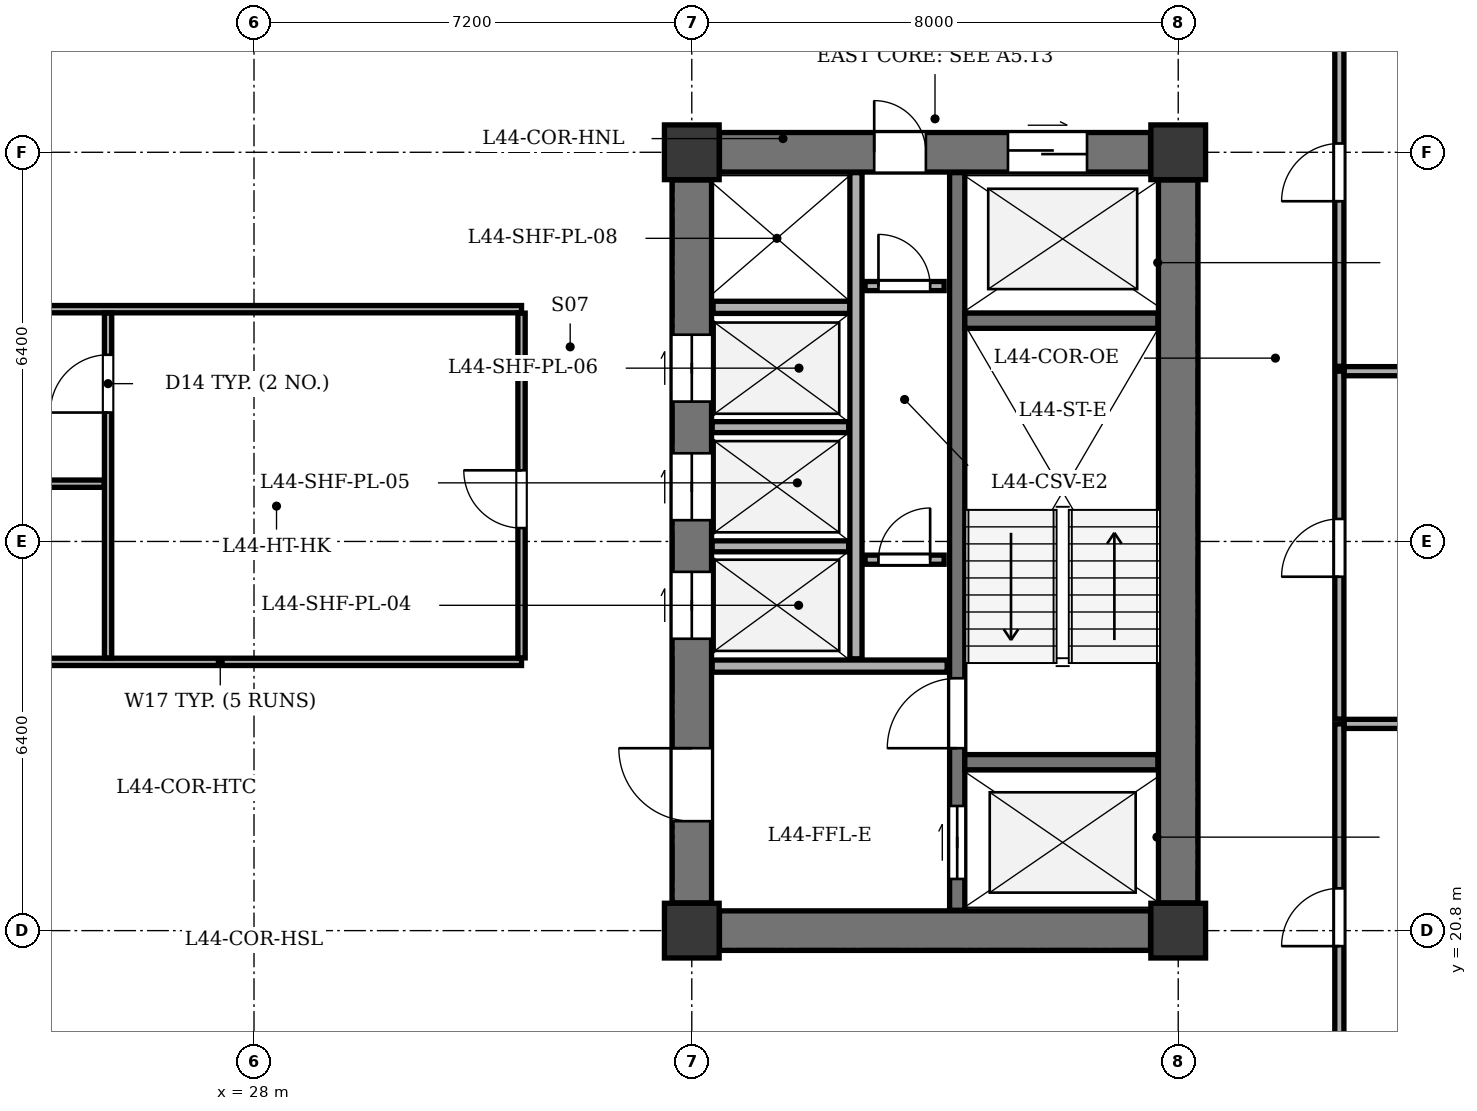
"""IFC4 building model, lengths in metres.
Left out: names, types, materials, properties, quantities, classifications, styles, units other than length and angle.
Written with IfcOpenShell. Run it as: python <this file> out.ifc"""

import sys

from ifc_helpers import new_model, si_unit, direction, frame, frame_2d, origin, origin_2d, place, context, subcontext, project, spatial, rectangle, extrude, element, fill, save


model = new_model("IFC4")
c1 = context("Model", 3, precision=1e-05, world=origin(), true_north=direction((0.0, 1.0)))
c2 = subcontext(c1, "Body", "Model", "MODEL_VIEW")
j1 = project(units=[si_unit("LENGTHUNIT", "METRE"), si_unit("PLANEANGLEUNIT", "RADIAN")], contexts=[c1])
p1 = place(None, origin())
s1 = spatial("IfcSite", under=j1, at=p1, CompositionType="ELEMENT")
p2 = place(p1, origin())
s2 = spatial("IfcBuilding", under=s1, at=p2, CompositionType="ELEMENT")
p3 = place(p2, frame((0.0, 0.0, 172.8)))
s3 = spatial("IfcBuildingStorey", under=s2, at=p3, CompositionType="ELEMENT", Elevation=172.8)
for number, where, z_axis, x_axis in (
    (1, (35.2, 20.8, 0.0), (0.0, 0.0, 1.0), (1.0, 0.0, 0.0)),
    (2, (43.2, 20.8, 0.0), (0.0, 0.0, 1.0), (1.0, 0.0, 0.0)),
    (3, (35.2, 33.6, 0.0), (0.0, 0.0, 1.0), (1.0, 0.0, 0.0)),
    (4, (43.2, 33.6, 0.0), (0.0, 0.0, 1.0), (1.0, 0.0, 0.0)),
):
    element("IfcColumn", number, at=place(p3, frame(where, z_axis=z_axis, x_axis=x_axis)), inside=s3, PredefinedType="COLUMN", context=c2, shape_type="SweptSolid", body=[
        extrude(rectangle(XDim=0.9, YDim=0.9, at=origin_2d()), origin(), (0.0, 0.0, 1.0), 3.5),
    ])
p4 = place(p3, frame((43.2, 21.255, 0.0), z_axis=(0.0, 0.0, 1.0), x_axis=(0.0, 1.0, 0.0)))
e5 = element("IfcWall", 5, at=p4, inside=s3, PredefinedType="SHEAR", context=c2, shape_type="SweptSolid", body=[
    extrude(rectangle(XDim=11.89, YDim=0.65, at=frame_2d((5.945, 0.0))), origin(), (0.0, 0.0, 1.0), 3.2),
])
p5 = place(p3, frame((35.655, 20.8, 0.0), z_axis=(0.0, 0.0, 1.0), x_axis=(1.0, 0.0, 0.0)))
e6 = element("IfcWall", 6, at=p5, inside=s3, PredefinedType="SHEAR", context=c2, shape_type="SweptSolid", body=[
    extrude(rectangle(XDim=7.09, YDim=0.65, at=frame_2d((3.545, 0.0))), origin(), (0.0, 0.0, 1.0), 3.2),
])
p6 = place(p3, frame((35.655, 33.6, 0.0), z_axis=(0.0, 0.0, 1.0), x_axis=(1.0, 0.0, 0.0)))
e7 = element("IfcWall", 7, at=p6, inside=s3, PredefinedType="SHEAR", context=c2, shape_type="SweptSolid", body=[
    extrude(rectangle(XDim=7.09, YDim=0.65, at=frame_2d((3.545, 0.0))), origin(), (0.0, 0.0, 1.0), 3.2),
])
p7 = place(p6, frame((4.745, 0.0, 0.0)))
e8 = element("IfcOpeningElement", 8, at=p7, cuts=e7, PredefinedType="OPENING", context=c2, shape_type="SweptSolid", body=[
    extrude(rectangle(XDim=1.3, YDim=2.15, at=frame_2d((0.65, 1.075))), frame((0.0, 0.335, 0.0), z_axis=(0.0, -1.0, 0.0), x_axis=(1.0, 0.0, 0.0)), (0.0, 0.0, 1.0), 0.67),
])
p8 = place(p6, frame((2.545, 0.0, 0.0)))
e9 = element("IfcOpeningElement", 9, at=p8, cuts=e7, PredefinedType="OPENING", context=c2, shape_type="SweptSolid", body=[
    extrude(rectangle(XDim=0.85, YDim=2.02, at=frame_2d((0.425, 1.01))), frame((0.0, 0.335, 0.0), z_axis=(0.0, -1.0, 0.0), x_axis=(1.0, 0.0, 0.0)), (0.0, 0.0, 1.0), 0.67),
])
p9 = place(p3, frame((35.2, 21.255, 0.0), z_axis=(0.0, 0.0, 1.0), x_axis=(0.0, 1.0, 0.0)))
e10 = element("IfcWall", 10, at=p9, inside=s3, PredefinedType="SHEAR", context=c2, shape_type="SweptSolid", body=[
    extrude(rectangle(XDim=11.89, YDim=0.65, at=frame_2d((5.945, 0.0))), origin(), (0.0, 0.0, 1.0), 3.2),
])
p10 = place(p9, frame((1.345, 0.0, 0.0)))
e11 = element("IfcOpeningElement", 11, at=p10, cuts=e10, PredefinedType="OPENING", context=c2, shape_type="SweptSolid", body=[
    extrude(rectangle(XDim=1.2, YDim=2.15, at=frame_2d((0.6, 1.075))), frame((0.0, 0.335, 0.0), z_axis=(0.0, -1.0, 0.0), x_axis=(1.0, 0.0, 0.0)), (0.0, 0.0, 1.0), 0.67),
])
p11 = place(p9, frame((4.345, 0.0, 0.0)))
e12 = element("IfcOpeningElement", 12, at=p11, cuts=e10, PredefinedType="OPENING", context=c2, shape_type="SweptSolid", body=[
    extrude(rectangle(XDim=1.1, YDim=2.1, at=frame_2d((0.55, 1.05))), frame((0.0, 0.335, 0.0), z_axis=(0.0, -1.0, 0.0), x_axis=(1.0, 0.0, 0.0)), (0.0, 0.0, 1.0), 0.67),
])
p12 = place(p9, frame((6.295, 0.0, 0.0)))
e13 = element("IfcOpeningElement", 13, at=p12, cuts=e10, PredefinedType="OPENING", context=c2, shape_type="SweptSolid", body=[
    extrude(rectangle(XDim=1.1, YDim=2.1, at=frame_2d((0.55, 1.05))), frame((0.0, 0.335, 0.0), z_axis=(0.0, -1.0, 0.0), x_axis=(1.0, 0.0, 0.0)), (0.0, 0.0, 1.0), 0.67),
])
p13 = place(p9, frame((8.245, 0.0, 0.0)))
e14 = element("IfcOpeningElement", 14, at=p13, cuts=e10, PredefinedType="OPENING", context=c2, shape_type="SweptSolid", body=[
    extrude(rectangle(XDim=1.1, YDim=2.1, at=frame_2d((0.55, 1.05))), frame((0.0, 0.335, 0.0), z_axis=(0.0, -1.0, 0.0), x_axis=(1.0, 0.0, 0.0)), (0.0, 0.0, 1.0), 0.67),
])
p14 = place(p3, frame((39.565, 21.135, 0.0), z_axis=(0.0, 0.0, 1.0), x_axis=(0.0, 1.0, 0.0)))
e15 = element("IfcWall", 15, at=p14, inside=s3, PredefinedType="SHEAR", context=c2, shape_type="SweptSolid", body=[
    extrude(rectangle(XDim=12.13, YDim=0.25, at=frame_2d((6.065, 0.0))), origin(), (0.0, 0.0, 1.0), 3.2),
])
p15 = place(p14, frame((0.515, 0.0, 0.0)))
e16 = element("IfcOpeningElement", 16, at=p15, cuts=e15, PredefinedType="OPENING", context=c2, shape_type="SweptSolid", body=[
    extrude(rectangle(XDim=1.2, YDim=2.15, at=frame_2d((0.6, 1.075))), frame((0.0, 0.135, 0.0), z_axis=(0.0, -1.0, 0.0), x_axis=(1.0, 0.0, 0.0)), (0.0, 0.0, 1.0), 0.27),
])
p16 = place(p14, frame((2.665, 0.0, 0.0)))
e17 = element("IfcOpeningElement", 17, at=p16, cuts=e15, PredefinedType="OPENING", context=c2, shape_type="SweptSolid", body=[
    extrude(rectangle(XDim=1.15, YDim=2.15, at=frame_2d((0.575, 1.075))), frame((0.0, 0.135, 0.0), z_axis=(0.0, -1.0, 0.0), x_axis=(1.0, 0.0, 0.0)), (0.0, 0.0, 1.0), 0.27),
])
for number, where, z_axis, x_axis in (
    (18, (39.69, 23.57, 0.0), (0.0, 0.0, 1.0), (1.0, 0.0, 0.0)),
    (19, (39.69, 30.83, 0.0), (0.0, 0.0, 1.0), (1.0, 0.0, 0.0)),
):
    element("IfcWall", number, at=place(p3, frame(where, z_axis=z_axis, x_axis=x_axis)), inside=s3, PredefinedType="SHEAR", context=c2, shape_type="SweptSolid", body=[
        extrude(rectangle(XDim=3.175, YDim=0.25, at=frame_2d((1.587, 0.0))), origin(), (0.0, 0.0, 1.0), 3.2),
    ])
p17 = place(p3, frame((35.535, 25.15, 0.0), z_axis=(0.0, 0.0, 1.0), x_axis=(1.0, 0.0, 0.0)))
e20 = element("IfcWall", 20, at=p17, inside=s3, PredefinedType="SOLIDWALL", context=c2, shape_type="SweptSolid", body=[
    extrude(rectangle(XDim=3.865, YDim=0.2, at=frame_2d((1.933, 0.0))), origin(), (0.0, 0.0, 1.0), 3.2),
])
p18 = place(p3, frame((35.55, 31.05, 0.0), z_axis=(0.0, 0.0, 1.0), x_axis=(1.0, 0.0, 0.0)))
e21 = element("IfcWall", 21, at=p18, inside=s3, PredefinedType="SOLIDWALL", context=c2, shape_type="SweptSolid", body=[
    extrude(rectangle(XDim=2.25, YDim=0.2, at=frame_2d((1.125, 0.0))), origin(), (0.0, 0.0, 1.0), 3.2),
])
p19 = place(p3, frame((37.9, 25.27, 0.0), z_axis=(0.0, 0.0, 1.0), x_axis=(0.0, 1.0, 0.0)))
e22 = element("IfcWall", 22, at=p19, inside=s3, PredefinedType="SOLIDWALL", context=c2, shape_type="SweptSolid", body=[
    extrude(rectangle(XDim=7.995, YDim=0.2, at=frame_2d((3.998, 0.0))), origin(), (0.0, 0.0, 1.0), 3.2),
])
for number, where, z_axis, x_axis in (
    (23, (35.535, 27.12, 0.0), (0.0, 0.0, 1.0), (1.0, 0.0, 0.0)),
    (24, (35.535, 29.08, 0.0), (0.0, 0.0, 1.0), (1.0, 0.0, 0.0)),
):
    element("IfcWall", number, at=place(p3, frame(where, z_axis=z_axis, x_axis=x_axis)), inside=s3, PredefinedType="PARTITIONING", context=c2, shape_type="SweptSolid", body=[
        extrude(rectangle(XDim=2.245, YDim=0.18, at=frame_2d((1.123, 0.0))), origin(), (0.0, 0.0, 1.0), 3.2),
    ])
p20 = place(p3, frame((38.05, 26.9, 0.0), z_axis=(0.0, 0.0, 1.0), x_axis=(1.0, 0.0, 0.0)))
e25 = element("IfcWall", 25, at=p20, inside=s3, PredefinedType="PARTITIONING", context=c2, shape_type="SweptSolid", body=[
    extrude(rectangle(XDim=1.3, YDim=0.15, at=frame_2d((0.65, 0.0))), origin(), (0.0, 0.0, 1.0), 3.2),
])
p21 = place(p20, frame((0.22, 0.0, 0.0)))
e26 = element("IfcOpeningElement", 26, at=p21, cuts=e25, PredefinedType="OPENING", context=c2, shape_type="SweptSolid", body=[
    extrude(rectangle(XDim=0.85, YDim=2.02, at=frame_2d((0.425, 1.01))), frame((0.0, 0.085, 0.0), z_axis=(0.0, -1.0, 0.0), x_axis=(1.0, 0.0, 0.0)), (0.0, 0.0, 1.0), 0.17),
])
p22 = place(p3, frame((38.05, 31.4, 0.0), z_axis=(0.0, 0.0, 1.0), x_axis=(1.0, 0.0, 0.0)))
e27 = element("IfcWall", 27, at=p22, inside=s3, PredefinedType="PARTITIONING", context=c2, shape_type="SweptSolid", body=[
    extrude(rectangle(XDim=1.3, YDim=0.15, at=frame_2d((0.65, 0.0))), origin(), (0.0, 0.0, 1.0), 3.2),
])
p23 = place(p22, frame((0.22, 0.0, 0.0)))
e28 = element("IfcOpeningElement", 28, at=p23, cuts=e27, PredefinedType="OPENING", context=c2, shape_type="SweptSolid", body=[
    extrude(rectangle(XDim=0.85, YDim=2.02, at=frame_2d((0.425, 1.01))), frame((0.0, 0.085, 0.0), z_axis=(0.0, -1.0, 0.0), x_axis=(1.0, 0.0, 0.0)), (0.0, 0.0, 1.0), 0.17),
])
p24 = place(p3, frame((20.46, 25.22, 0.0), z_axis=(0.0, 0.0, 1.0), x_axis=(1.0, 0.0, 0.0)))
e29 = element("IfcWall", 29, at=p24, inside=s3, PredefinedType="PARTITIONING", context=c2, shape_type="SweptSolid", body=[
    extrude(rectangle(XDim=11.94, YDim=0.12, at=frame_2d((5.97, 0.0))), origin(), (0.0, 0.0, 1.0), 3.2),
])
p25 = place(p24, frame((0.68, 0.0, 0.0)))
e30 = element("IfcOpeningElement", 30, at=p25, cuts=e29, PredefinedType="OPENING", context=c2, shape_type="SweptSolid", body=[
    extrude(rectangle(XDim=1.0, YDim=2.1, at=frame_2d((0.5, 1.05))), frame((0.0, 0.07, 0.0), z_axis=(0.0, -1.0, 0.0), x_axis=(1.0, 0.0, 0.0)), (0.0, 0.0, 1.0), 0.14),
])
p26 = place(p3, frame((20.46, 31.02, 0.0), z_axis=(0.0, 0.0, 1.0), x_axis=(1.0, 0.0, 0.0)))
e31 = element("IfcWall", 31, at=p26, inside=s3, PredefinedType="PARTITIONING", context=c2, shape_type="SweptSolid", body=[
    extrude(rectangle(XDim=11.94, YDim=0.12, at=frame_2d((5.97, 0.0))), origin(), (0.0, 0.0, 1.0), 3.2),
])
p27 = place(p3, frame((32.4, 25.285, 0.0), z_axis=(0.0, 0.0, 1.0), x_axis=(0.0, 1.0, 0.0)))
e32 = element("IfcWall", 32, at=p27, inside=s3, PredefinedType="PARTITIONING", context=c2, shape_type="SweptSolid", body=[
    extrude(rectangle(XDim=5.67, YDim=0.12, at=frame_2d((2.835, 0.0))), origin(), (0.0, 0.0, 1.0), 3.2),
])
p28 = place(p27, frame((2.135, 0.0, 0.0)))
e33 = element("IfcOpeningElement", 33, at=p28, cuts=e32, PredefinedType="OPENING", context=c2, shape_type="SweptSolid", body=[
    extrude(rectangle(XDim=0.95, YDim=2.1, at=frame_2d((0.475, 1.05))), frame((0.0, 0.07, 0.0), z_axis=(0.0, -1.0, 0.0), x_axis=(1.0, 0.0, 0.0)), (0.0, 0.0, 1.0), 0.14),
])
p29 = place(p3, frame((25.6, 25.285, 0.0), z_axis=(0.0, 0.0, 1.0), x_axis=(0.0, 1.0, 0.0)))
e34 = element("IfcWall", 34, at=p29, inside=s3, PredefinedType="PARTITIONING", context=c2, shape_type="SweptSolid", body=[
    extrude(rectangle(XDim=5.67, YDim=0.12, at=frame_2d((2.835, 0.0))), origin(), (0.0, 0.0, 1.0), 3.2),
])
p30 = place(p29, frame((4.035, 0.0, 0.0)))
e35 = element("IfcOpeningElement", 35, at=p30, cuts=e34, PredefinedType="OPENING", context=c2, shape_type="SweptSolid", body=[
    extrude(rectangle(XDim=0.95, YDim=2.1, at=frame_2d((0.475, 1.05))), frame((0.0, 0.07, 0.0), z_axis=(0.0, -1.0, 0.0), x_axis=(1.0, 0.0, 0.0)), (0.0, 0.0, 1.0), 0.14),
])
p31 = place(p3, frame((16.65, 28.15, 0.0), z_axis=(0.0, 0.0, 1.0), x_axis=(1.0, 0.0, 0.0)))
e36 = element("IfcWall", 36, at=p31, inside=s3, PredefinedType="PARTITIONING", context=c2, shape_type="SweptSolid", body=[
    extrude(rectangle(XDim=8.885, YDim=0.12, at=frame_2d((4.442, 0.0))), origin(), (0.0, 0.0, 1.0), 3.2),
])
p32 = place(p3, frame((45.85, 17.93, 0.0), z_axis=(0.0, 0.0, 1.0), x_axis=(0.0, 1.0, 0.0)))
e37 = element("IfcWall", 37, at=p32, inside=s3, PredefinedType="PARTITIONING", context=c2, shape_type="SweptSolid", body=[
    extrude(rectangle(XDim=6.27, YDim=0.15, at=frame_2d((3.135, 0.0))), origin(), (0.0, 0.0, 1.0), 3.2),
])
p33 = place(p32, frame((2.615, 0.0, 0.0)))
e38 = element("IfcOpeningElement", 38, at=p33, cuts=e37, PredefinedType="OPENING", context=c2, shape_type="SweptSolid", body=[
    extrude(rectangle(XDim=0.95, YDim=2.1, at=frame_2d((0.475, 1.05))), frame((0.0, 0.085, 0.0), z_axis=(0.0, -1.0, 0.0), x_axis=(1.0, 0.0, 0.0)), (0.0, 0.0, 1.0), 0.17),
])
p34 = place(p3, frame((45.93, 24.2, 0.0), z_axis=(0.0, 0.0, 1.0), x_axis=(1.0, 0.0, 0.0)))
e39 = element("IfcWall", 39, at=p34, inside=s3, PredefinedType="PARTITIONING", context=c2, shape_type="SweptSolid", body=[
    extrude(rectangle(XDim=9.395, YDim=0.15, at=frame_2d((4.698, 0.0))), origin(), (0.0, 0.0, 1.0), 3.2),
])
p35 = place(p3, frame((45.85, 24.28, 0.0), z_axis=(0.0, 0.0, 1.0), x_axis=(0.0, 1.0, 0.0)))
e40 = element("IfcWall", 40, at=p35, inside=s3, PredefinedType="PARTITIONING", context=c2, shape_type="SweptSolid", body=[
    extrude(rectangle(XDim=5.72, YDim=0.15, at=frame_2d((2.86, 0.0))), origin(), (0.0, 0.0, 1.0), 3.2),
])
p36 = place(p35, frame((2.34, 0.0, 0.0)))
e41 = element("IfcOpeningElement", 41, at=p36, cuts=e40, PredefinedType="OPENING", context=c2, shape_type="SweptSolid", body=[
    extrude(rectangle(XDim=0.95, YDim=2.1, at=frame_2d((0.475, 1.05))), frame((0.0, 0.085, 0.0), z_axis=(0.0, -1.0, 0.0), x_axis=(1.0, 0.0, 0.0)), (0.0, 0.0, 1.0), 0.17),
])
p37 = place(p3, frame((45.93, 30.0, 0.0), z_axis=(0.0, 0.0, 1.0), x_axis=(1.0, 0.0, 0.0)))
e42 = element("IfcWall", 42, at=p37, inside=s3, PredefinedType="PARTITIONING", context=c2, shape_type="SweptSolid", body=[
    extrude(rectangle(XDim=9.395, YDim=0.15, at=frame_2d((4.698, 0.0))), origin(), (0.0, 0.0, 1.0), 3.2),
])
p38 = place(p3, frame((45.85, 30.08, 0.0), z_axis=(0.0, 0.0, 1.0), x_axis=(0.0, 1.0, 0.0)))
e43 = element("IfcWall", 43, at=p38, inside=s3, PredefinedType="PARTITIONING", context=c2, shape_type="SweptSolid", body=[
    extrude(rectangle(XDim=6.39, YDim=0.15, at=frame_2d((3.195, 0.0))), origin(), (0.0, 0.0, 1.0), 3.2),
])
p39 = place(p38, frame((2.715, 0.0, 0.0)))
e44 = element("IfcOpeningElement", 44, at=p39, cuts=e43, PredefinedType="OPENING", context=c2, shape_type="SweptSolid", body=[
    extrude(rectangle(XDim=0.95, YDim=2.1, at=frame_2d((0.475, 1.05))), frame((0.0, 0.085, 0.0), z_axis=(0.0, -1.0, 0.0), x_axis=(1.0, 0.0, 0.0)), (0.0, 0.0, 1.0), 0.17),
])
p40 = place(p7, origin())
e45 = element("IfcDoor", 45, at=p40, inside=s3, OperationType="DOUBLE_DOOR_SLIDING", PredefinedType="DOOR", context=c2, shape_type="SweptSolid", body=[
    extrude(rectangle(XDim=1.3, YDim=2.15, at=frame_2d((0.65, 1.075))), frame((0.0, 0.025, 0.0), z_axis=(0.0, -1.0, 0.0), x_axis=(1.0, 0.0, 0.0)), (0.0, 0.0, 1.0), 0.05),
])
fill(e8, e45)
p41 = place(p8, origin())
e46 = element("IfcDoor", 46, at=p41, inside=s3, OperationType="SINGLE_SWING_LEFT", PredefinedType="DOOR", context=c2, shape_type="SweptSolid", body=[
    extrude(rectangle(XDim=0.85, YDim=2.02, at=frame_2d((0.425, 1.01))), frame((0.0, 0.025, 0.0), z_axis=(0.0, -1.0, 0.0), x_axis=(1.0, 0.0, 0.0)), (0.0, 0.0, 1.0), 0.05),
])
fill(e9, e46)
p42 = place(p10, origin())
e47 = element("IfcDoor", 47, at=p42, inside=s3, OperationType="SINGLE_SWING_RIGHT", PredefinedType="DOOR", context=c2, shape_type="SweptSolid", body=[
    extrude(rectangle(XDim=1.2, YDim=2.15, at=frame_2d((0.6, 1.075))), frame((0.0, 0.025, 0.0), z_axis=(0.0, -1.0, 0.0), x_axis=(1.0, 0.0, 0.0)), (0.0, 0.0, 1.0), 0.05),
])
fill(e11, e47)
p43 = place(p11, origin())
e48 = element("IfcDoor", 48, at=p43, inside=s3, OperationType="DOUBLE_DOOR_SLIDING", PredefinedType="DOOR", context=c2, shape_type="SweptSolid", body=[
    extrude(rectangle(XDim=1.1, YDim=2.1, at=frame_2d((0.55, 1.05))), frame((0.0, 0.025, 0.0), z_axis=(0.0, -1.0, 0.0), x_axis=(1.0, 0.0, 0.0)), (0.0, 0.0, 1.0), 0.05),
])
fill(e12, e48)
p44 = place(p12, origin())
e49 = element("IfcDoor", 49, at=p44, inside=s3, OperationType="DOUBLE_DOOR_SLIDING", PredefinedType="DOOR", context=c2, shape_type="SweptSolid", body=[
    extrude(rectangle(XDim=1.1, YDim=2.1, at=frame_2d((0.55, 1.05))), frame((0.0, 0.025, 0.0), z_axis=(0.0, -1.0, 0.0), x_axis=(1.0, 0.0, 0.0)), (0.0, 0.0, 1.0), 0.05),
])
fill(e13, e49)
p45 = place(p13, origin())
e50 = element("IfcDoor", 50, at=p45, inside=s3, OperationType="DOUBLE_DOOR_SLIDING", PredefinedType="DOOR", context=c2, shape_type="SweptSolid", body=[
    extrude(rectangle(XDim=1.1, YDim=2.1, at=frame_2d((0.55, 1.05))), frame((0.0, 0.025, 0.0), z_axis=(0.0, -1.0, 0.0), x_axis=(1.0, 0.0, 0.0)), (0.0, 0.0, 1.0), 0.05),
])
fill(e14, e50)
p46 = place(p15, origin())
e51 = element("IfcDoor", 51, at=p46, inside=s3, OperationType="DOUBLE_DOOR_SLIDING", PredefinedType="DOOR", context=c2, shape_type="SweptSolid", body=[
    extrude(rectangle(XDim=1.2, YDim=2.15, at=frame_2d((0.6, 1.075))), frame((0.0, 0.025, 0.0), z_axis=(0.0, -1.0, 0.0), x_axis=(1.0, 0.0, 0.0)), (0.0, 0.0, 1.0), 0.05),
])
fill(e16, e51)
p47 = place(p16, origin())
e52 = element("IfcDoor", 52, at=p47, inside=s3, OperationType="SINGLE_SWING_LEFT", PredefinedType="DOOR", context=c2, shape_type="SweptSolid", body=[
    extrude(rectangle(XDim=1.15, YDim=2.15, at=frame_2d((0.575, 1.075))), frame((0.0, 0.025, 0.0), z_axis=(0.0, -1.0, 0.0), x_axis=(1.0, 0.0, 0.0)), (0.0, 0.0, 1.0), 0.05),
])
fill(e17, e52)
p48 = place(p21, origin())
e53 = element("IfcDoor", 53, at=p48, inside=s3, OperationType="SINGLE_SWING_RIGHT", PredefinedType="DOOR", context=c2, shape_type="SweptSolid", body=[
    extrude(rectangle(XDim=0.85, YDim=2.02, at=frame_2d((0.425, 1.01))), frame((0.0, 0.025, 0.0), z_axis=(0.0, -1.0, 0.0), x_axis=(1.0, 0.0, 0.0)), (0.0, 0.0, 1.0), 0.05),
])
fill(e26, e53)
p49 = place(p23, origin())
e54 = element("IfcDoor", 54, at=p49, inside=s3, OperationType="SINGLE_SWING_LEFT", PredefinedType="DOOR", context=c2, shape_type="SweptSolid", body=[
    extrude(rectangle(XDim=0.85, YDim=2.02, at=frame_2d((0.425, 1.01))), frame((0.0, 0.025, 0.0), z_axis=(0.0, -1.0, 0.0), x_axis=(1.0, 0.0, 0.0)), (0.0, 0.0, 1.0), 0.05),
])
fill(e28, e54)
p50 = place(p30, origin())
e55 = element("IfcDoor", 55, at=p50, inside=s3, OperationType="SINGLE_SWING_LEFT", PredefinedType="DOOR", context=c2, shape_type="SweptSolid", body=[
    extrude(rectangle(XDim=0.95, YDim=2.1, at=frame_2d((0.475, 1.05))), frame((0.0, 0.025, 0.0), z_axis=(0.0, -1.0, 0.0), x_axis=(1.0, 0.0, 0.0)), (0.0, 0.0, 1.0), 0.05),
])
fill(e35, e55)
p51 = place(p28, origin())
e56 = element("IfcDoor", 56, at=p51, inside=s3, OperationType="SINGLE_SWING_RIGHT", PredefinedType="DOOR", context=c2, shape_type="SweptSolid", body=[
    extrude(rectangle(XDim=0.95, YDim=2.1, at=frame_2d((0.475, 1.05))), frame((0.0, 0.025, 0.0), z_axis=(0.0, -1.0, 0.0), x_axis=(1.0, 0.0, 0.0)), (0.0, 0.0, 1.0), 0.05),
])
fill(e33, e56)
p52 = place(p33, origin())
e57 = element("IfcDoor", 57, at=p52, inside=s3, OperationType="SINGLE_SWING_LEFT", PredefinedType="DOOR", context=c2, shape_type="SweptSolid", body=[
    extrude(rectangle(XDim=0.95, YDim=2.1, at=frame_2d((0.475, 1.05))), frame((0.0, 0.025, 0.0), z_axis=(0.0, -1.0, 0.0), x_axis=(1.0, 0.0, 0.0)), (0.0, 0.0, 1.0), 0.05),
])
fill(e38, e57)
p53 = place(p36, origin())
e58 = element("IfcDoor", 58, at=p53, inside=s3, OperationType="SINGLE_SWING_LEFT", PredefinedType="DOOR", context=c2, shape_type="SweptSolid", body=[
    extrude(rectangle(XDim=0.95, YDim=2.1, at=frame_2d((0.475, 1.05))), frame((0.0, 0.025, 0.0), z_axis=(0.0, -1.0, 0.0), x_axis=(1.0, 0.0, 0.0)), (0.0, 0.0, 1.0), 0.05),
])
fill(e41, e58)
p54 = place(p39, origin())
e59 = element("IfcDoor", 59, at=p54, inside=s3, OperationType="SINGLE_SWING_LEFT", PredefinedType="DOOR", context=c2, shape_type="SweptSolid", body=[
    extrude(rectangle(XDim=0.95, YDim=2.1, at=frame_2d((0.475, 1.05))), frame((0.0, 0.025, 0.0), z_axis=(0.0, -1.0, 0.0), x_axis=(1.0, 0.0, 0.0)), (0.0, 0.0, 1.0), 0.05),
])
fill(e44, e59)
save(model, sys.argv[1])
